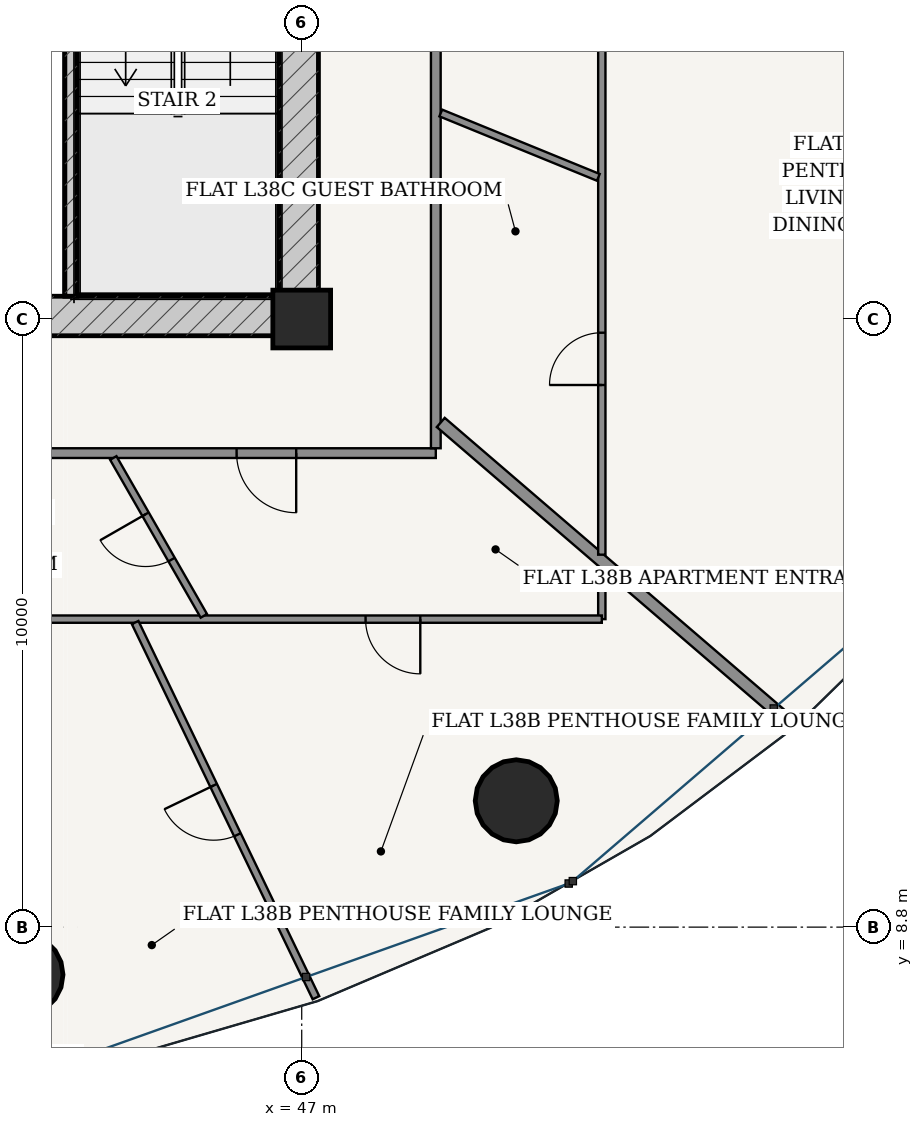
"""IFC4 building model, lengths in metres.
Left out: names, types, materials, properties, quantities, classifications, styles, units other than length and angle.
Written with IfcOpenShell. Run it as: python <this file> out.ifc"""

import sys

from ifc_helpers import new_model, si_unit, direction, frame, frame_2d, origin, origin_2d, place, context, subcontext, project, spatial, rectangle, hollow_circle, extrude, source, transform, mapped, element, fill, save


model = new_model("IFC4")
c1 = context("Model", 3, precision=1e-05, world=origin(), true_north=direction((-0.2419218956, 0.970295726276)))
c2 = subcontext(c1, "Body", "Model", "MODEL_VIEW")
j1 = project(units=[si_unit("LENGTHUNIT", "METRE"), si_unit("PLANEANGLEUNIT", "RADIAN")], contexts=[c1])
p1 = place(None, origin())
s1 = spatial("IfcSite", under=j1, at=p1, CompositionType="ELEMENT")
p2 = place(p1, origin())
s2 = spatial("IfcBuilding", under=s1, at=p2, CompositionType="ELEMENT")
p3 = place(p2, frame((0.0, 0.0, 146.2)))
s3 = spatial("IfcBuildingStorey", under=s2, at=p3, CompositionType="ELEMENT", Elevation=146.2)
p4 = place(p3, frame((47.0, 18.8, 0.0), z_axis=(0.0, 0.0, 1.0), x_axis=(1.0, 0.0, 0.0)))
e1 = element("IfcColumn", 1, at=p4, inside=s3, PredefinedType="COLUMN", context=c2, shape_type="SweptSolid", body=[
    extrude(rectangle(XDim=0.95, YDim=0.95, at=origin_2d()), origin(), (0.0, 0.0, 1.0), 3.6),
])
p5 = place(p3, frame((28.725, 18.85, 0.0), z_axis=(0.0, 0.0, 1.0), x_axis=(1.0, 0.0, 0.0)))
e2 = element("IfcWall", 2, at=p5, inside=s3, PredefinedType="SHEAR", context=c2, shape_type="SweptSolid", body=[
    extrude(rectangle(XDim=18.55, YDim=0.65, at=frame_2d((9.275, 0.0))), origin(), (0.0, 0.0, 1.0), 3.33),
])
p6 = place(p5, frame((7.51, 0.0, 0.0)))
e3 = element("IfcOpeningElement", 3, at=p6, cuts=e2, PredefinedType="OPENING", context=c2, shape_type="SweptSolid", body=[
    extrude(rectangle(XDim=0.85, YDim=2.1, at=frame_2d((0.425, 1.05))), frame((0.0, 0.335, 0.0), z_axis=(0.0, -1.0, 0.0), x_axis=(1.0, 0.0, 0.0)), (0.0, 0.0, 1.0), 0.67),
])
p7 = place(p5, frame((10.59, 0.0, 0.0)))
e4 = element("IfcOpeningElement", 4, at=p7, cuts=e2, PredefinedType="OPENING", context=c2, shape_type="SweptSolid", body=[
    extrude(rectangle(XDim=0.85, YDim=2.1, at=frame_2d((0.425, 1.05))), frame((0.0, 0.335, 0.0), z_axis=(0.0, -1.0, 0.0), x_axis=(1.0, 0.0, 0.0)), (0.0, 0.0, 1.0), 0.67),
])
p8 = place(p3, frame((46.95, 19.175, 0.0), z_axis=(0.0, 0.0, 1.0), x_axis=(0.0, 1.0, 0.0)))
e5 = element("IfcWall", 5, at=p8, inside=s3, PredefinedType="SHEAR", context=c2, shape_type="SweptSolid", body=[
    extrude(rectangle(XDim=15.25, YDim=0.65, at=frame_2d((7.625, 0.0))), origin(), (0.0, 0.0, 1.0), 3.33),
])
p9 = place(p8, frame((9.875, 0.0, 0.0)))
e6 = element("IfcOpeningElement", 6, at=p9, cuts=e5, PredefinedType="OPENING", context=c2, shape_type="SweptSolid", body=[
    extrude(rectangle(XDim=1.5, YDim=2.2, at=frame_2d((0.75, 1.1))), frame((0.0, 0.335, 0.0), z_axis=(0.0, -1.0, 0.0), x_axis=(1.0, 0.0, 0.0)), (0.0, 0.0, 1.0), 0.67),
])
p10 = place(p3, frame((43.205, 19.175, 0.0), z_axis=(0.0, 0.0, 1.0), x_axis=(0.0, 1.0, 0.0)))
e7 = element("IfcWall", 7, at=p10, inside=s3, PredefinedType="SOLIDWALL", context=c2, shape_type="SweptSolid", body=[
    extrude(rectangle(XDim=7.375, YDim=0.2, at=frame_2d((3.688, 0.0))), origin(), (0.0, 0.0, 1.0), 3.33),
])
for number, where, z_axis, x_axis in (
    (8, (42.399, 8.018, 0.0), (0.0, 0.0, 1.0), (1.0, 0.0, 0.0)),
    (9, (50.528, 10.877, 0.0), (0.0, 0.0, 1.0), (1.0, 0.0, 0.0)),
):
    element("IfcColumn", number, at=place(p3, frame(where, z_axis=z_axis, x_axis=x_axis)), inside=s3, PredefinedType="COLUMN", context=c2, shape_type="SweptSolid", body=[
        extrude(hollow_circle(Radius=0.675, WallThickness=0.042, at=origin_2d()), origin(), (0.0, 0.0, 1.0), 3.6),
    ])
p11 = place(p3, frame((34.32, 16.595, 0.0), z_axis=(0.0, 0.0, 1.0), x_axis=(1.0, 0.0, 0.0)))
e10 = element("IfcWall", 10, at=p11, inside=s3, PredefinedType="PARTITIONING", context=c2, shape_type="SweptSolid", body=[
    extrude(rectangle(XDim=14.885, YDim=0.16, at=frame_2d((7.442, 0.0))), origin(), (0.0, 0.0, 1.0), 2.776),
])
p12 = place(p11, frame((11.609, 0.0, 0.0)))
e11 = element("IfcOpeningElement", 11, at=p12, cuts=e10, PredefinedType="OPENING", context=c2, shape_type="SweptSolid", body=[
    extrude(rectangle(XDim=0.98, YDim=2.2, at=frame_2d((0.49, 1.1))), frame((0.0, 0.09, 0.0), z_axis=(0.0, -1.0, 0.0), x_axis=(1.0, 0.0, 0.0)), (0.0, 0.0, 1.0), 0.18),
])
p13 = place(p3, frame((49.205, 16.675, 0.0), z_axis=(0.0, 0.0, 1.0), x_axis=(0.0, 1.0, 0.0)))
e12 = element("IfcWall", 12, at=p13, inside=s3, PredefinedType="PARTITIONING", context=c2, shape_type="SweptSolid", body=[
    extrude(rectangle(XDim=18.4, YDim=0.16, at=frame_2d((9.2, 0.0))), origin(), (0.0, 0.0, 1.0), 2.776),
])
p14 = place(p13, frame((15.299, 0.0, 0.0)))
e13 = element("IfcOpeningElement", 13, at=p14, cuts=e12, PredefinedType="OPENING", context=c2, shape_type="SweptSolid", body=[
    extrude(rectangle(XDim=0.98, YDim=2.2, at=frame_2d((0.49, 1.1))), frame((0.0, 0.09, 0.0), z_axis=(0.0, -1.0, 0.0), x_axis=(1.0, 0.0, 0.0)), (0.0, 0.0, 1.0), 0.18),
])
p15 = place(p3, frame((51.935, 14.721, 0.0), z_axis=(0.0, 0.0, 1.0), x_axis=(0.0, -1.0, 0.0)))
e14 = element("IfcWall", 14, at=p15, inside=s3, PredefinedType="PARTITIONING", context=c2, shape_type="SweptSolid", body=[
    extrude(rectangle(XDim=0.856, YDim=0.12, at=frame_2d((0.428, 0.0))), origin(), (0.0, 0.0, 1.0), 3.33),
])
p16 = place(p3, frame((51.935, 13.865, 0.0), z_axis=(0.0, 0.0, 1.0), x_axis=(-1.0, 0.0, 0.0)))
e15 = element("IfcWall", 15, at=p16, inside=s3, PredefinedType="PARTITIONING", context=c2, shape_type="SweptSolid", body=[
    extrude(rectangle(XDim=20.345, YDim=0.12, at=frame_2d((10.172, 0.0))), origin(), (0.0, 0.0, 1.0), 2.776),
])
p17 = place(p16, frame((2.985, 0.0, 0.0)))
e16 = element("IfcOpeningElement", 16, at=p17, cuts=e15, PredefinedType="OPENING", context=c2, shape_type="SweptSolid", body=[
    extrude(rectangle(XDim=0.9, YDim=2.15, at=frame_2d((0.45, 1.075))), frame((0.0, 0.07, 0.0), z_axis=(0.0, -1.0, 0.0), x_axis=(1.0, 0.0, 0.0)), (0.0, 0.0, 1.0), 0.14),
])
p18 = place(p16, frame((12.333, 0.0, 0.0)))
e17 = element("IfcOpeningElement", 17, at=p18, cuts=e15, PredefinedType="OPENING", context=c2, shape_type="SweptSolid", body=[
    extrude(rectangle(XDim=0.9, YDim=2.15, at=frame_2d((0.45, 1.075))), frame((0.0, 0.07, 0.0), z_axis=(0.0, -1.0, 0.0), x_axis=(1.0, 0.0, 0.0)), (0.0, 0.0, 1.0), 0.14),
])
p19 = place(p16, frame((18.436, 0.0, 0.0)))
e18 = element("IfcOpeningElement", 18, at=p19, cuts=e15, PredefinedType="OPENING", context=c2, shape_type="SweptSolid", body=[
    extrude(rectangle(XDim=0.9, YDim=2.15, at=frame_2d((0.45, 1.075))), frame((0.0, 0.07, 0.0), z_axis=(0.0, -1.0, 0.0), x_axis=(1.0, 0.0, 0.0)), (0.0, 0.0, 1.0), 0.14),
])
p20 = place(p3, frame((44.26, 13.809, 0.0), z_axis=(0.0, 0.0, 1.0), x_axis=(0.434162832987, -0.900834410118, 0.0)))
e19 = element("IfcWall", 19, at=p20, inside=s3, PredefinedType="PARTITIONING", context=c2, shape_type="SweptSolid", body=[
    extrude(rectangle(XDim=6.849, YDim=0.12, at=frame_2d((3.425, 0.0))), origin(), (0.0, 0.0, 1.0), 2.846),
])
p21 = place(p20, frame((2.975, 0.0, 0.0)))
e20 = element("IfcOpeningElement", 20, at=p21, cuts=e19, PredefinedType="OPENING", context=c2, shape_type="SweptSolid", body=[
    extrude(rectangle(XDim=0.9, YDim=2.15, at=frame_2d((0.45, 1.075))), frame((0.0, 0.07, 0.0), z_axis=(0.0, -1.0, 0.0), x_axis=(1.0, 0.0, 0.0)), (0.0, 0.0, 1.0), 0.14),
])
p22 = place(p3, frame((43.901, 16.515, 0.0), z_axis=(0.0, 0.0, 1.0), x_axis=(0.497640283609, -0.86738350695, 0.0)))
e21 = element("IfcWall", 21, at=p22, inside=s3, PredefinedType="PARTITIONING", context=c2, shape_type="SweptSolid", body=[
    extrude(rectangle(XDim=2.993, YDim=0.12, at=frame_2d((1.497, 0.0))), origin(), (0.0, 0.0, 1.0), 3.005),
])
p23 = place(p22, frame((1.067, 0.0, 0.0)))
e22 = element("IfcOpeningElement", 22, at=p23, cuts=e21, PredefinedType="OPENING", context=c2, shape_type="SweptSolid", body=[
    extrude(rectangle(XDim=0.86, YDim=2.15, at=frame_2d((0.43, 1.075))), frame((0.0, 0.07, 0.0), z_axis=(0.0, -1.0, 0.0), x_axis=(1.0, 0.0, 0.0)), (0.0, 0.0, 1.0), 0.14),
])
p24 = place(p3, frame((49.287, 17.099, 0.0), z_axis=(0.0, 0.0, 1.0), x_axis=(0.758362300646, -0.651833276965, 0.0)))
e23 = element("IfcWall", 23, at=p24, inside=s3, PredefinedType="PARTITIONING", context=c2, shape_type="SweptSolid", body=[
    extrude(rectangle(XDim=7.618, YDim=0.2, at=frame_2d((3.809, 0.0))), origin(), (0.0, 0.0, 1.0), 2.846),
])
p25 = place(p3, frame((51.935, 37.885, 0.0), z_axis=(0.0, 0.0, 1.0), x_axis=(0.0, -1.0, 0.0)))
e24 = element("IfcWall", 24, at=p25, inside=s3, PredefinedType="PARTITIONING", context=c2, shape_type="SweptSolid", body=[
    extrude(rectangle(XDim=22.96, YDim=0.12, at=frame_2d((11.48, 0.0))), origin(), (0.0, 0.0, 1.0), 2.776),
])
p26 = place(p25, frame((4.61, 0.0, 0.0)))
e25 = element("IfcOpeningElement", 25, at=p26, cuts=e24, PredefinedType="OPENING", context=c2, shape_type="SweptSolid", body=[
    extrude(rectangle(XDim=0.9, YDim=2.15, at=frame_2d((0.45, 1.075))), frame((0.0, 0.07, 0.0), z_axis=(0.0, -1.0, 0.0), x_axis=(1.0, 0.0, 0.0)), (0.0, 0.0, 1.0), 0.14),
])
p27 = place(p25, frame((19.31, 0.0, 0.0)))
e26 = element("IfcOpeningElement", 26, at=p27, cuts=e24, PredefinedType="OPENING", context=c2, shape_type="SweptSolid", body=[
    extrude(rectangle(XDim=0.86, YDim=2.15, at=frame_2d((0.43, 1.075))), frame((0.0, 0.07, 0.0), z_axis=(0.0, -1.0, 0.0), x_axis=(1.0, 0.0, 0.0)), (0.0, 0.0, 1.0), 0.14),
])
p28 = place(p25, frame((13.341, 0.0, 0.0)))
e27 = element("IfcOpeningElement", 27, at=p28, cuts=e24, PredefinedType="OPENING", context=c2, shape_type="SweptSolid", body=[
    extrude(rectangle(XDim=0.9, YDim=2.15, at=frame_2d((0.45, 1.075))), frame((0.0, 0.07, 0.0), z_axis=(0.0, -1.0, 0.0), x_axis=(1.0, 0.0, 0.0)), (0.0, 0.0, 1.0), 0.14),
])
p29 = place(p3, frame((49.287, 22.188, 0.0), z_axis=(0.0, 0.0, 1.0), x_axis=(0.925708058909, -0.378238799796, 0.0)))
e28 = element("IfcWall", 28, at=p29, inside=s3, PredefinedType="PARTITIONING", context=c2, shape_type="SweptSolid", body=[
    extrude(rectangle(XDim=2.799, YDim=0.12, at=frame_2d((1.399, 0.0))), origin(), (0.0, 0.0, 1.0), 3.33),
])
m1 = source(origin(), c2, "Body", "SweptSolid", [
    extrude(rectangle(XDim=0.98, YDim=2.2, at=frame_2d((0.49, 1.1))), frame((0.0, 0.025, 0.0), z_axis=(0.0, -1.0, 0.0), x_axis=(1.0, 0.0, 0.0)), (0.0, 0.0, 1.0), 0.05),
])
p30 = place(p12, frame((0.98, 0.0, 0.0), z_axis=(0.0, 0.0, 1.0), x_axis=(-1.0, 0.0, 0.0)))
e29 = element("IfcDoor", 29, at=p30, inside=s3, OperationType="SINGLE_SWING_LEFT", PredefinedType="DOOR", context=c2, shape_type="MappedRepresentation", body=[
    mapped(m1, transform((0.0, 0.0, 0.0), scale=1.0)),
])
fill(e11, e29)
m2 = source(origin(), c2, "Body", "SweptSolid", [
    extrude(rectangle(XDim=0.86, YDim=2.15, at=frame_2d((0.43, 1.075))), frame((0.0, 0.025, 0.0), z_axis=(0.0, -1.0, 0.0), x_axis=(1.0, 0.0, 0.0)), (0.0, 0.0, 1.0), 0.05),
])
p31 = place(p23, frame((0.86, 0.0, 0.0), z_axis=(0.0, 0.0, 1.0), x_axis=(-1.0, 0.0, 0.0)))
e30 = element("IfcDoor", 30, at=p31, inside=s3, OperationType="SINGLE_SWING_RIGHT", PredefinedType="DOOR", context=c2, shape_type="MappedRepresentation", body=[
    mapped(m2, transform((0.0, 0.0, 0.0), scale=1.0)),
])
fill(e22, e30)
m3 = source(origin(), c2, "Body", "SweptSolid", [
    extrude(rectangle(XDim=0.9, YDim=2.15, at=frame_2d((0.45, 1.075))), frame((0.0, 0.025, 0.0), z_axis=(0.0, -1.0, 0.0), x_axis=(1.0, 0.0, 0.0)), (0.0, 0.0, 1.0), 0.05),
])
p32 = place(p17, origin())
e31 = element("IfcDoor", 31, at=p32, inside=s3, OperationType="SINGLE_SWING_LEFT", PredefinedType="DOOR", context=c2, shape_type="MappedRepresentation", body=[
    mapped(m3, transform((0.0, 0.0, 0.0), scale=1.0)),
])
fill(e16, e31)
p33 = place(p21, frame((0.9, 0.0, 0.0), z_axis=(0.0, 0.0, 1.0), x_axis=(-1.0, 0.0, 0.0)))
e32 = element("IfcDoor", 32, at=p33, inside=s3, OperationType="SINGLE_SWING_RIGHT", PredefinedType="DOOR", context=c2, shape_type="MappedRepresentation", body=[
    mapped(m3, transform((0.0, 0.0, 0.0), scale=1.0)),
])
fill(e20, e32)
p34 = place(p27, frame((0.86, 0.0, 0.0), z_axis=(0.0, 0.0, 1.0), x_axis=(-1.0, 0.0, 0.0)))
e33 = element("IfcDoor", 33, at=p34, inside=s3, OperationType="SINGLE_SWING_LEFT", PredefinedType="DOOR", context=c2, shape_type="MappedRepresentation", body=[
    mapped(m2, transform((0.0, 0.0, 0.0), scale=1.0)),
])
fill(e26, e33)
save(model, sys.argv[1])
